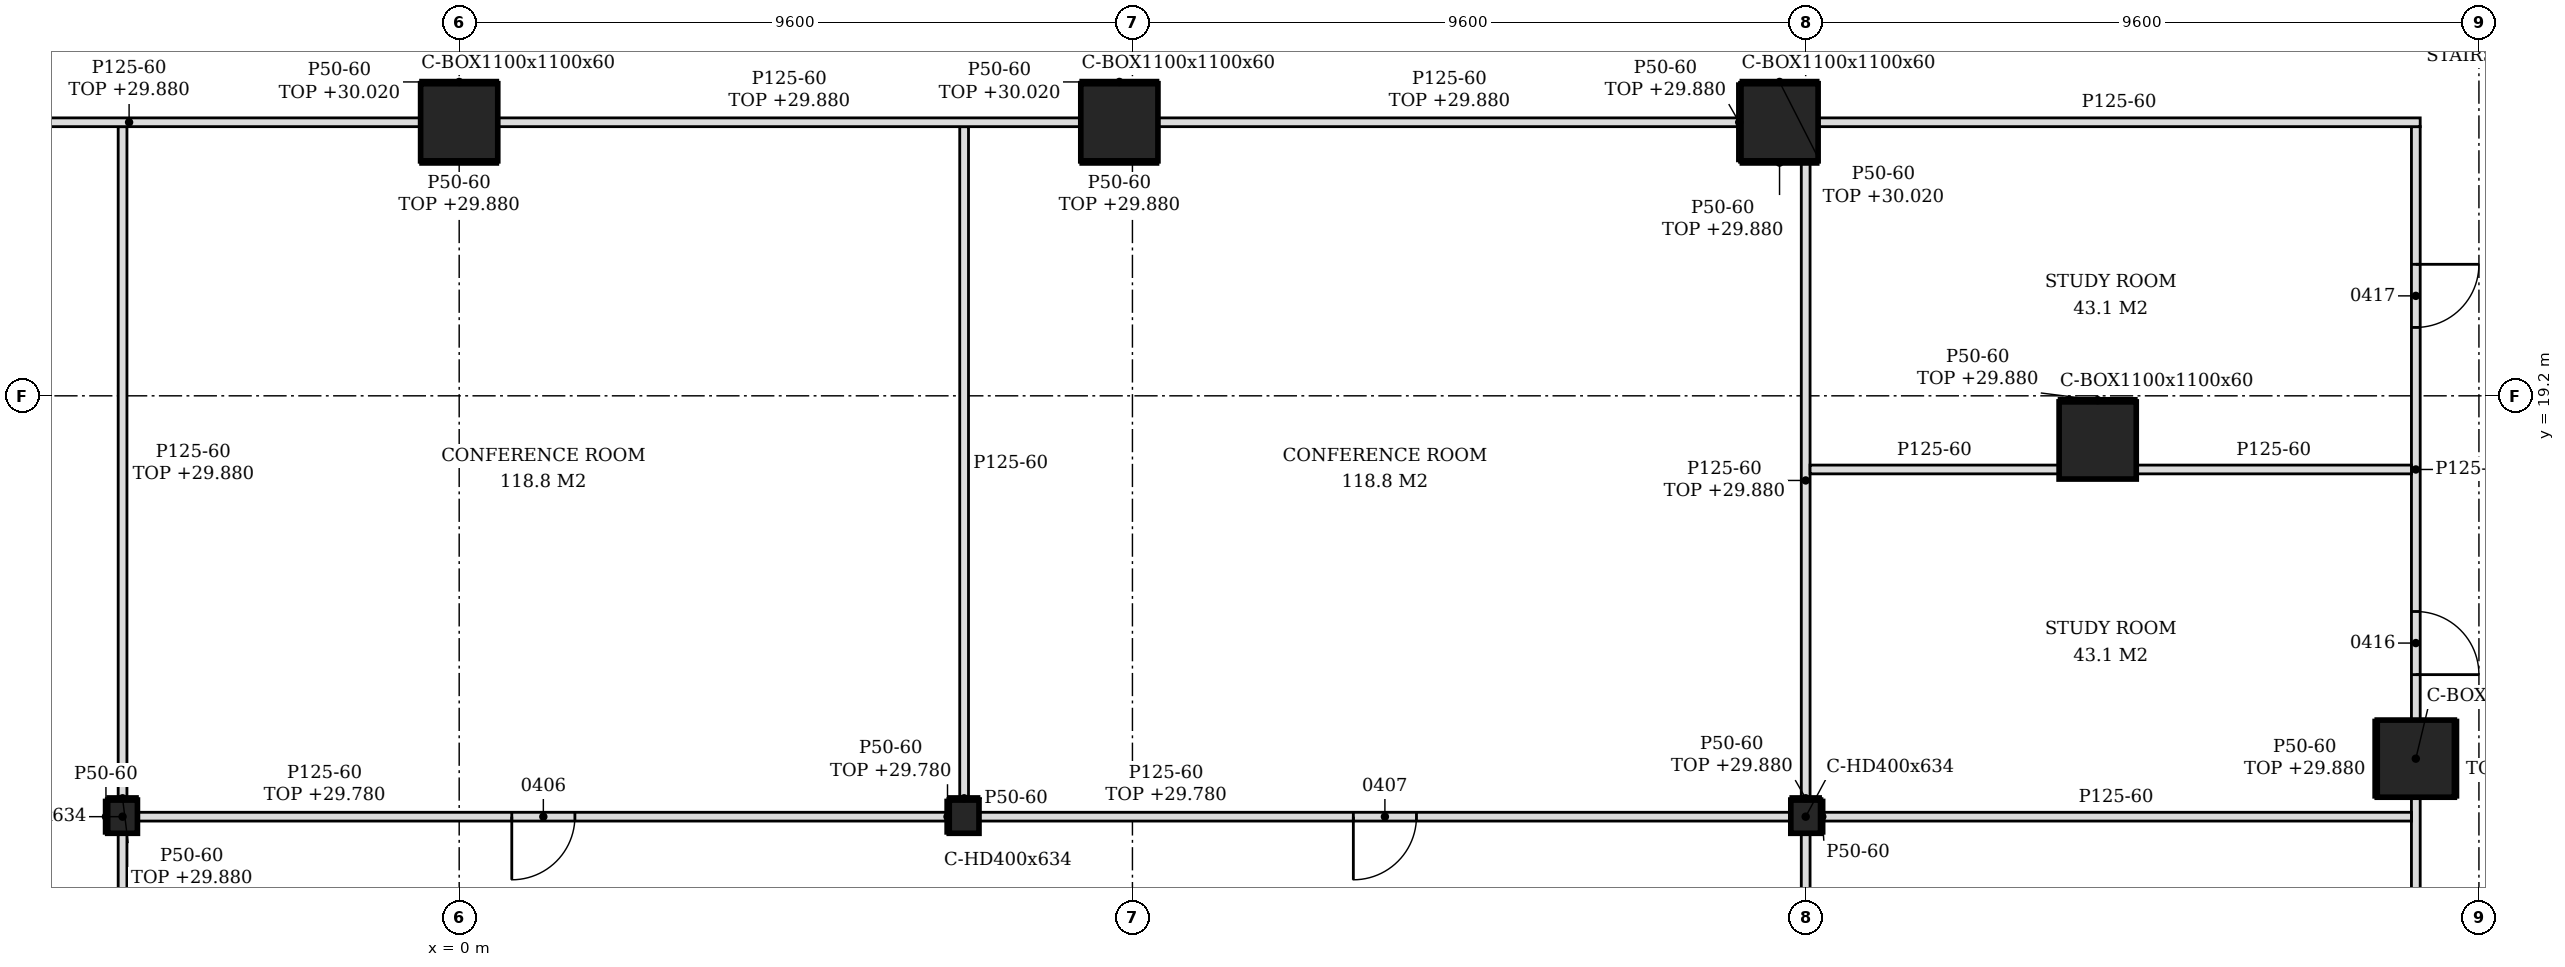
"""IFC4 building model, lengths in metres.
Left out: names, types, materials, properties, quantities, classifications, styles, units other than length and angle.
Written with IfcOpenShell. Run it as: python <this file> out.ifc"""

import sys

from ifc_helpers import new_model, si_unit, direction, frame, frame_2d, origin, origin_2d, place, context, subcontext, project, spatial, polyline, rectangle, hollow_rectangle, i_section, outline, extrude, element, fill, save


model = new_model("IFC4")
c1 = context("Model", 3, precision=1e-05, world=origin(), true_north=direction((0.0, 1.0)))
c2 = subcontext(c1, "Body", "Model", "MODEL_VIEW")
j1 = project(units=[si_unit("LENGTHUNIT", "METRE"), si_unit("PLANEANGLEUNIT", "RADIAN")], contexts=[c1])
p1 = place(None, origin())
s1 = spatial("IfcSite", under=j1, at=p1, CompositionType="ELEMENT")
p2 = place(p1, origin())
s2 = spatial("IfcBuilding", under=s1, at=p2, CompositionType="ELEMENT")
p3 = place(p2, frame((0.0, 0.0, 25.8)))
s3 = spatial("IfcBuildingStorey", under=s2, at=p3, CompositionType="ELEMENT", Elevation=25.8)
for number, where, z_axis, x_axis in (
    (1, (27.9, 14.027, -0.2), (0.0, 0.0, 1.0), (1.0, 0.0, 0.0)),
    (2, (23.364, 18.564, -0.2), (0.0, 0.0, 1.0), (1.0, 0.0, 0.0)),
    (3, (18.827, 23.1, -0.2), (0.0, 0.0, 1.0), (1.0, 0.0, 0.0)),
    (4, (9.414, 23.1, -0.2), (0.0, 0.0, 1.0), (1.0, 0.0, 0.0)),
    (5, (0.0, 23.1, -0.2), (0.0, 0.0, 1.0), (1.0, 0.0, 0.0)),
):
    element("IfcColumn", number, at=place(p3, frame(where, z_axis=z_axis, x_axis=x_axis)), inside=s3, PredefinedType="COLUMN", context=c2, shape_type="SweptSolid", body=[
        extrude(hollow_rectangle(XDim=1.1, YDim=1.1, WallThickness=0.06, at=origin_2d()), origin(), (0.0, 0.0, 1.0), 4.8),
    ])
for number, where, z_axis, x_axis in (
    (6, (-4.8, 13.2, -0.2), (0.0, 0.0, 1.0), (1.0, 0.0, 0.0)),
    (7, (7.2, 13.2, -0.2), (0.0, 0.0, 1.0), (1.0, 0.0, 0.0)),
    (8, (19.2, 13.2, -0.2), (0.0, 0.0, 1.0), (1.0, 0.0, 0.0)),
):
    element("IfcColumn", number, at=place(p3, frame(where, z_axis=z_axis, x_axis=x_axis)), inside=s3, PredefinedType="COLUMN", context=c2, shape_type="SweptSolid", body=[
        extrude(i_section(OverallWidth=0.424, OverallDepth=0.474, WebThickness=0.048, FlangeThickness=0.077, FilletRadius=0.015, at=origin_2d()), origin(), (0.0, 0.0, 1.0), 4.8),
    ])
for number, where, z_axis, x_axis in (
    (9, (-4.8, 7.863, 0.0), (0.0, 0.0, 1.0), (0.0, 1.0, 0.0)),
    (10, (19.2, 7.863, 0.0), (0.0, 0.0, 1.0), (0.0, 1.0, 0.0)),
):
    element("IfcWall", number, at=place(p3, frame(where, z_axis=z_axis, x_axis=x_axis)), inside=s3, PredefinedType="PARTITIONING", context=c2, shape_type="SweptSolid", body=[
        extrude(rectangle(XDim=5.1, YDim=0.125, at=frame_2d((2.55, 0.0))), origin(), (0.0, 0.0, 1.0), 3.98),
    ])
p4 = place(p3, frame((27.9, 7.863, 0.0), z_axis=(0.0, 0.0, 1.0), x_axis=(0.0, 1.0, 0.0)))
e11 = element("IfcWall", 11, at=p4, inside=s3, PredefinedType="PARTITIONING", context=c2, shape_type="SweptSolid", body=[
    extrude(rectangle(XDim=5.615, YDim=0.125, at=frame_2d((2.807, 0.0))), origin(), (0.0, 0.0, 1.0), 4.08),
])
p5 = place(p3, frame((-4.588, 13.2, 0.0), z_axis=(0.0, 0.0, 1.0), x_axis=(1.0, 0.0, 0.0)))
e12 = element("IfcWall", 12, at=p5, inside=s3, PredefinedType="PARTITIONING", context=c2, shape_type="SweptSolid", body=[
    extrude(rectangle(XDim=11.576, YDim=0.125, at=frame_2d((5.788, 0.0))), origin(), (0.0, 0.0, 1.0), 3.98),
])
p6 = place(p5, frame((5.338, 0.0, 0.0)))
e13 = element("IfcOpeningElement", 13, at=p6, cuts=e12, PredefinedType="OPENING", context=c2, shape_type="SweptSolid", body=[
    extrude(rectangle(XDim=0.9, YDim=2.1, at=frame_2d((0.45, 1.05))), frame((0.0, 0.073, 0.0), z_axis=(0.0, -1.0, 0.0), x_axis=(1.0, 0.0, 0.0)), (0.0, 0.0, 1.0), 0.145),
])
p7 = place(p3, frame((7.412, 13.2, 0.0), z_axis=(0.0, 0.0, 1.0), x_axis=(1.0, 0.0, 0.0)))
e14 = element("IfcWall", 14, at=p7, inside=s3, PredefinedType="PARTITIONING", context=c2, shape_type="SweptSolid", body=[
    extrude(rectangle(XDim=11.576, YDim=0.125, at=frame_2d((5.788, 0.0))), origin(), (0.0, 0.0, 1.0), 3.98),
])
p8 = place(p7, frame((5.338, 0.0, 0.0)))
e15 = element("IfcOpeningElement", 15, at=p8, cuts=e14, PredefinedType="OPENING", context=c2, shape_type="SweptSolid", body=[
    extrude(rectangle(XDim=0.9, YDim=2.1, at=frame_2d((0.45, 1.05))), frame((0.0, 0.073, 0.0), z_axis=(0.0, -1.0, 0.0), x_axis=(1.0, 0.0, 0.0)), (0.0, 0.0, 1.0), 0.145),
])
p9 = place(p3, frame((19.412, 13.2, 0.0), z_axis=(0.0, 0.0, 1.0), x_axis=(1.0, 0.0, 0.0)))
e16 = element("IfcWall", 16, at=p9, inside=s3, PredefinedType="PARTITIONING", context=c2, shape_type="SweptSolid", body=[
    extrude(outline(polyline([(0.0, 0.0), (8.425, 0.0), (8.426, 4.08), (8.338, 4.08), (8.336, 4.6), (4.678, 4.6), (4.676, 4.18), (4.498, 4.18), (4.496, 4.6), (0.0, 4.6), (0.0, 0.0)])), frame((0.0, 0.062, 0.0), z_axis=(0.0, -1.0, 0.0), x_axis=(1.0, 0.0, 0.0)), (0.0, 0.0, 1.0), 0.125),
])
p10 = place(p3, frame((-4.8, 13.437, 0.0), z_axis=(0.0, 0.0, 1.0), x_axis=(0.0, 1.0, 0.0)))
e17 = element("IfcWall", 17, at=p10, inside=s3, PredefinedType="PARTITIONING", context=c2, shape_type="SweptSolid", body=[
    extrude(rectangle(XDim=9.601, YDim=0.125, at=frame_2d((4.8, 0.0))), origin(), (0.0, 0.0, 1.0), 4.08),
])
p11 = place(p3, frame((7.2, 13.437, 0.0), z_axis=(0.0, 0.0, 1.0), x_axis=(0.0, 1.0, 0.0)))
e18 = element("IfcWall", 18, at=p11, inside=s3, PredefinedType="PARTITIONING", context=c2, shape_type="SweptSolid", body=[
    extrude(outline(polyline([(0.0, 0.0), (9.601, 0.0), (9.601, 4.08), (9.513, 4.08), (9.511, 4.6), (0.0, 4.6), (0.0, 0.0)])), frame((0.0, 0.062, 0.0), z_axis=(0.0, -1.0, 0.0), x_axis=(1.0, 0.0, 0.0)), (0.0, 0.0, 1.0), 0.125),
])
p12 = place(p3, frame((19.2, 13.437, 0.0), z_axis=(0.0, 0.0, 1.0), x_axis=(0.0, 1.0, 0.0)))
e19 = element("IfcWall", 19, at=p12, inside=s3, PredefinedType="PARTITIONING", context=c2, shape_type="SweptSolid", body=[
    extrude(rectangle(XDim=9.113, YDim=0.125, at=frame_2d((4.557, 0.0))), origin(), (0.0, 0.0, 1.0), 4.08),
])
p13 = place(p3, frame((27.9, 14.577, 0.0), z_axis=(0.0, 0.0, 1.0), x_axis=(0.0, 1.0, 0.0)))
e20 = element("IfcWall", 20, at=p13, inside=s3, PredefinedType="PARTITIONING", context=c2, shape_type="SweptSolid", body=[
    extrude(outline(polyline([(0.0, 0.0), (8.46, 0.0), (8.46, 4.6), (4.713, 4.6), (4.711, 4.18), (4.533, 4.18), (4.531, 4.6), (0.0, 4.6), (0.0, 0.0)])), frame((0.0, 0.062, 0.0), z_axis=(0.0, -1.0, 0.0), x_axis=(1.0, 0.0, 0.0)), (0.0, 0.0, 1.0), 0.125),
])
p14 = place(p13, frame((0.648, 0.0, 0.0)))
e21 = element("IfcOpeningElement", 21, at=p14, cuts=e20, PredefinedType="OPENING", context=c2, shape_type="SweptSolid", body=[
    extrude(rectangle(XDim=0.9, YDim=2.1, at=frame_2d((0.45, 1.05))), frame((0.0, 0.073, 0.0), z_axis=(0.0, -1.0, 0.0), x_axis=(1.0, 0.0, 0.0)), (0.0, 0.0, 1.0), 0.145),
])
p15 = place(p13, frame((5.598, 0.0, 0.0)))
e22 = element("IfcOpeningElement", 22, at=p15, cuts=e20, PredefinedType="OPENING", context=c2, shape_type="SweptSolid", body=[
    extrude(rectangle(XDim=0.9, YDim=2.1, at=frame_2d((0.45, 1.05))), frame((0.0, 0.073, 0.0), z_axis=(0.0, -1.0, 0.0), x_axis=(1.0, 0.0, 0.0)), (0.0, 0.0, 1.0), 0.145),
])
p16 = place(p3, frame((19.262, 18.15, 0.0), z_axis=(0.0, 0.0, 1.0), x_axis=(1.0, 0.0, 0.0)))
e23 = element("IfcWall", 23, at=p16, inside=s3, PredefinedType="PARTITIONING", context=c2, shape_type="SweptSolid", body=[
    extrude(outline(polyline([(0.0, 0.0), (3.551, 0.0), (3.551, 4.6), (0.038, 4.6), (0.035, 4.08), (0.0, 4.08), (0.0, 0.0)])), frame((0.0, 0.062, 0.0), z_axis=(0.0, -1.0, 0.0), x_axis=(1.0, 0.0, 0.0)), (0.0, 0.0, 1.0), 0.125),
])
p17 = place(p3, frame((23.914, 18.15, 0.0), z_axis=(0.0, 0.0, 1.0), x_axis=(1.0, 0.0, 0.0)))
e24 = element("IfcWall", 24, at=p17, inside=s3, PredefinedType="PARTITIONING", context=c2, shape_type="SweptSolid", body=[
    extrude(outline(polyline([(0.0, 0.0), (3.924, 0.0), (3.924, 4.6), (0.138, 4.6), (0.136, 4.08), (0.0, 4.08), (0.0, 0.0)])), frame((0.0, 0.062, 0.0), z_axis=(0.0, -1.0, 0.0), x_axis=(1.0, 0.0, 0.0)), (0.0, 0.0, 1.0), 0.125),
])
for number, where, z_axis, x_axis in (
    (25, (-8.864, 23.1, 0.0), (0.0, 0.0, 1.0), (1.0, 0.0, 0.0)),
    (26, (0.55, 23.1, 0.0), (0.0, 0.0, 1.0), (1.0, 0.0, 0.0)),
    (27, (9.964, 23.1, 0.0), (0.0, 0.0, 1.0), (1.0, 0.0, 0.0)),
):
    element("IfcWall", number, at=place(p3, frame(where, z_axis=z_axis, x_axis=x_axis)), inside=s3, PredefinedType="PARTITIONING", context=c2, shape_type="SweptSolid", body=[
        extrude(rectangle(XDim=8.313, YDim=0.125, at=frame_2d((4.157, 0.0))), origin(), (0.0, 0.0, 1.0), 4.08),
    ])
p18 = place(p3, frame((19.377, 23.1, 0.0), z_axis=(0.0, 0.0, 1.0), x_axis=(1.0, 0.0, 0.0)))
e28 = element("IfcWall", 28, at=p18, inside=s3, PredefinedType="PARTITIONING", context=c2, shape_type="SweptSolid", body=[
    extrude(rectangle(XDim=8.585, YDim=0.125, at=frame_2d((4.292, 0.0))), origin(), (0.0, 0.0, 1.0), 4.6),
])
for number, where, z_axis, x_axis in (
    (29, (-5.037, 12.963, 0.0), (0.0, 0.0, 1.0), (0.0, 1.0, 0.0)),
    (30, (19.437, 12.963, 0.0), (0.0, 0.0, 1.0), (0.0, 1.0, 0.0)),
):
    element("IfcWall", number, at=place(p3, frame(where, z_axis=z_axis, x_axis=x_axis)), inside=s3, PredefinedType="PARTITIONING", context=c2, shape_type="SweptSolid", body=[
        extrude(rectangle(XDim=0.474, YDim=0.05, at=frame_2d((0.237, 0.0))), origin(), (0.0, 0.0, 1.0), 4.6),
    ])
for number, where, z_axis, x_axis in (
    (31, (27.325, 13.477, 0.0), (0.0, 0.0, 1.0), (0.0, 1.0, 0.0)),
    (32, (28.475, 13.477, 0.0), (0.0, 0.0, 1.0), (0.0, 1.0, 0.0)),
):
    element("IfcWall", number, at=place(p3, frame(where, z_axis=z_axis, x_axis=x_axis)), inside=s3, PredefinedType="PARTITIONING", context=c2, shape_type="SweptSolid", body=[
        extrude(rectangle(XDim=1.1, YDim=0.05, at=frame_2d((0.55, 0.0))), origin(), (0.0, 0.0, 1.0), 4.08),
    ])
p19 = place(p3, frame((-5.012, 13.462, 0.0), z_axis=(0.0, 0.0, 1.0), x_axis=(1.0, 0.0, 0.0)))
e33 = element("IfcWall", 33, at=p19, inside=s3, PredefinedType="PARTITIONING", context=c2, shape_type="SweptSolid", body=[
    extrude(rectangle(XDim=0.424, YDim=0.05, at=frame_2d((0.212, 0.0))), origin(), (0.0, 0.0, 1.0), 4.08),
])
p20 = place(p3, frame((6.988, 13.462, 0.0), z_axis=(0.0, 0.0, 1.0), x_axis=(1.0, 0.0, 0.0)))
e34 = element("IfcWall", 34, at=p20, inside=s3, PredefinedType="PARTITIONING", context=c2, shape_type="SweptSolid", body=[
    extrude(rectangle(XDim=0.424, YDim=0.05, at=frame_2d((0.212, 0.0))), origin(), (0.0, 0.0, 1.0), 4.6),
])
p21 = place(p3, frame((18.988, 13.462, 0.0), z_axis=(0.0, 0.0, 1.0), x_axis=(1.0, 0.0, 0.0)))
e35 = element("IfcWall", 35, at=p21, inside=s3, PredefinedType="PARTITIONING", context=c2, shape_type="SweptSolid", body=[
    extrude(rectangle(XDim=0.424, YDim=0.05, at=frame_2d((0.212, 0.0))), origin(), (0.0, 0.0, 1.0), 4.08),
])
p22 = place(p3, frame((6.963, 12.963, 0.0), z_axis=(0.0, 0.0, 1.0), x_axis=(0.0, 1.0, 0.0)))
e36 = element("IfcWall", 36, at=p22, inside=s3, PredefinedType="PARTITIONING", context=c2, shape_type="SweptSolid", body=[
    extrude(rectangle(XDim=0.474, YDim=0.05, at=frame_2d((0.237, 0.0))), origin(), (0.0, 0.0, 1.0), 3.98),
])
for number, where, z_axis, x_axis in (
    (37, (18.252, 22.55, 0.0), (0.0, 0.0, 1.0), (0.0, 1.0, 0.0)),
    (38, (22.814, 19.139, 0.0), (0.0, 0.0, 1.0), (1.0, 0.0, 0.0)),
):
    element("IfcWall", number, at=place(p3, frame(where, z_axis=z_axis, x_axis=x_axis)), inside=s3, PredefinedType="PARTITIONING", context=c2, shape_type="SweptSolid", body=[
        extrude(rectangle(XDim=1.1, YDim=0.05, at=frame_2d((0.55, 0.0))), origin(), (0.0, 0.0, 1.0), 4.08),
    ])
p23 = place(p3, frame((-0.55, 22.525, 0.0), z_axis=(0.0, 0.0, 1.0), x_axis=(1.0, 0.0, 0.0)))
e39 = element("IfcWall", 39, at=p23, inside=s3, PredefinedType="PARTITIONING", context=c2, shape_type="SweptSolid", body=[
    extrude(rectangle(XDim=1.1, YDim=0.05, at=frame_2d((0.55, 0.0))), origin(), (0.0, 0.0, 1.0), 4.08),
])
p24 = place(p3, frame((-0.55, 23.675, 0.0), z_axis=(0.0, 0.0, 1.0), x_axis=(1.0, 0.0, 0.0)))
e40 = element("IfcWall", 40, at=p24, inside=s3, PredefinedType="PARTITIONING", context=c2, shape_type="SweptSolid", body=[
    extrude(rectangle(XDim=1.1, YDim=0.05, at=frame_2d((0.55, 0.0))), origin(), (0.0, 0.0, 1.0), 4.22),
])
p25 = place(p3, frame((8.864, 22.525, 0.0), z_axis=(0.0, 0.0, 1.0), x_axis=(1.0, 0.0, 0.0)))
e41 = element("IfcWall", 41, at=p25, inside=s3, PredefinedType="PARTITIONING", context=c2, shape_type="SweptSolid", body=[
    extrude(rectangle(XDim=1.1, YDim=0.05, at=frame_2d((0.55, 0.0))), origin(), (0.0, 0.0, 1.0), 4.08),
])
p26 = place(p3, frame((8.864, 23.675, 0.0), z_axis=(0.0, 0.0, 1.0), x_axis=(1.0, 0.0, 0.0)))
e42 = element("IfcWall", 42, at=p26, inside=s3, PredefinedType="PARTITIONING", context=c2, shape_type="SweptSolid", body=[
    extrude(rectangle(XDim=1.1, YDim=0.05, at=frame_2d((0.55, 0.0))), origin(), (0.0, 0.0, 1.0), 4.22),
])
p27 = place(p3, frame((18.277, 22.525, 0.0), z_axis=(0.0, 0.0, 1.0), x_axis=(1.0, 0.0, 0.0)))
e43 = element("IfcWall", 43, at=p27, inside=s3, PredefinedType="PARTITIONING", context=c2, shape_type="SweptSolid", body=[
    extrude(rectangle(XDim=1.1, YDim=0.05, at=frame_2d((0.55, 0.0))), origin(), (0.0, 0.0, 1.0), 4.08),
])
p28 = place(p3, frame((18.277, 23.675, 0.0), z_axis=(0.0, 0.0, 1.0), x_axis=(1.0, 0.0, 0.0)))
e44 = element("IfcWall", 44, at=p28, inside=s3, PredefinedType="PARTITIONING", context=c2, shape_type="SweptSolid", body=[
    extrude(rectangle(XDim=1.1, YDim=0.05, at=frame_2d((0.55, 0.0))), origin(), (0.0, 0.0, 1.0), 4.22),
])
p29 = place(p6, frame((0.9, 0.0, 0.0), z_axis=(0.0, 0.0, 1.0), x_axis=(-1.0, 0.0, 0.0)))
e45 = element("IfcDoor", 45, at=p29, inside=s3, OperationType="SINGLE_SWING_RIGHT", PredefinedType="DOOR", context=c2, shape_type="SweptSolid", body=[
    extrude(rectangle(XDim=0.9, YDim=2.1, at=frame_2d((0.45, 1.05))), frame((0.0, 0.025, 0.0), z_axis=(0.0, -1.0, 0.0), x_axis=(1.0, 0.0, 0.0)), (0.0, 0.0, 1.0), 0.05),
])
fill(e13, e45)
p30 = place(p8, frame((0.9, 0.0, 0.0), z_axis=(0.0, 0.0, 1.0), x_axis=(-1.0, 0.0, 0.0)))
e46 = element("IfcDoor", 46, at=p30, inside=s3, OperationType="SINGLE_SWING_RIGHT", PredefinedType="DOOR", context=c2, shape_type="SweptSolid", body=[
    extrude(rectangle(XDim=0.9, YDim=2.1, at=frame_2d((0.45, 1.05))), frame((0.0, 0.025, 0.0), z_axis=(0.0, -1.0, 0.0), x_axis=(1.0, 0.0, 0.0)), (0.0, 0.0, 1.0), 0.05),
])
fill(e15, e46)
p31 = place(p14, frame((0.9, 0.0, 0.0), z_axis=(0.0, 0.0, 1.0), x_axis=(-1.0, 0.0, 0.0)))
e47 = element("IfcDoor", 47, at=p31, inside=s3, OperationType="SINGLE_SWING_RIGHT", PredefinedType="DOOR", context=c2, shape_type="SweptSolid", body=[
    extrude(rectangle(XDim=0.9, YDim=2.1, at=frame_2d((0.45, 1.05))), frame((0.0, 0.025, 0.0), z_axis=(0.0, -1.0, 0.0), x_axis=(1.0, 0.0, 0.0)), (0.0, 0.0, 1.0), 0.05),
])
fill(e21, e47)
p32 = place(p15, frame((0.9, 0.0, 0.0), z_axis=(0.0, 0.0, 1.0), x_axis=(-1.0, 0.0, 0.0)))
e48 = element("IfcDoor", 48, at=p32, inside=s3, OperationType="SINGLE_SWING_LEFT", PredefinedType="DOOR", context=c2, shape_type="SweptSolid", body=[
    extrude(rectangle(XDim=0.9, YDim=2.1, at=frame_2d((0.45, 1.05))), frame((0.0, 0.025, 0.0), z_axis=(0.0, -1.0, 0.0), x_axis=(1.0, 0.0, 0.0)), (0.0, 0.0, 1.0), 0.05),
])
fill(e22, e48)
save(model, sys.argv[1])
